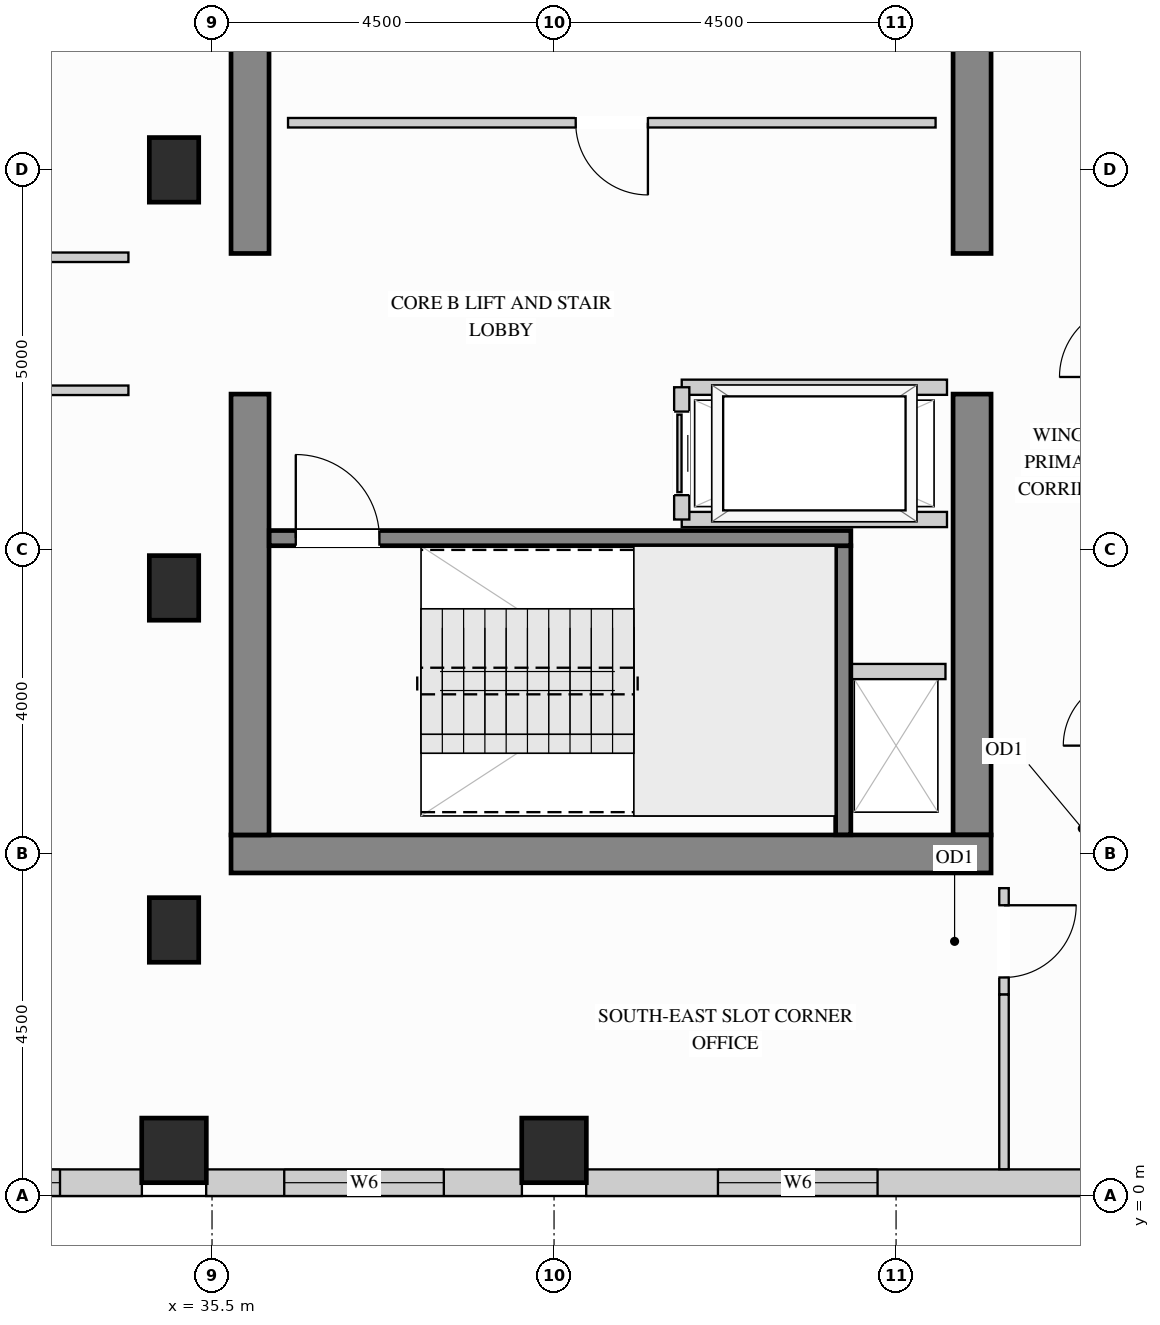
"""IFC4 building model, lengths in metres.
Left out: names, types, materials, properties, quantities, classifications, styles, units other than length and angle.
Written with IfcOpenShell. Run it as: python <this file> out.ifc"""

import sys

from ifc_helpers import new_model, si_unit, direction, frame, frame_2d, origin, origin_2d, place, context, subcontext, project, spatial, rectangle, extrude, source, transform, mapped, element, fill, save


model = new_model("IFC4")
c1 = context("Model", 3, precision=1e-05, world=origin(), true_north=direction((0.0, 1.0)))
c2 = subcontext(c1, "Body", "Model", "MODEL_VIEW")
j1 = project(units=[si_unit("LENGTHUNIT", "METRE"), si_unit("PLANEANGLEUNIT", "RADIAN")], contexts=[c1])
p1 = place(None, origin())
s1 = spatial("IfcSite", under=j1, at=p1, CompositionType="ELEMENT")
p2 = place(p1, origin())
s2 = spatial("IfcBuilding", under=s1, at=p2, CompositionType="ELEMENT")
p3 = place(p2, frame((0.0, 0.0, 255.6)))
s3 = spatial("IfcBuildingStorey", under=s2, at=p3, CompositionType="ELEMENT", Elevation=255.6)
m1 = source(origin(), c2, "Body", "SweptSolid", [
    extrude(rectangle(XDim=0.65, YDim=0.85, at=origin_2d()), origin(), (0.0, 0.0, 1.0), 3.4),
])
for number, where, z_axis, x_axis in (
    (1, (35.0, 13.5, 0.0), (0.0, 0.0, 1.0), (1.0, 0.0, 0.0)),
    (2, (35.0, 3.5, 0.0), (0.0, 0.0, 1.0), (1.0, 0.0, 0.0)),
    (3, (35.0, 8.0, 0.0), (0.0, 0.0, 1.0), (1.0, 0.0, 0.0)),
):
    element("IfcColumn", number, at=place(p3, frame(where, z_axis=z_axis, x_axis=x_axis)), inside=s3, PredefinedType="COLUMN", context=c2, shape_type="MappedRepresentation", body=[
        mapped(m1, transform((0.0, 0.0, 0.0), x_axis=(1.0, 0.0, 0.0), y_axis=(0.0, 1.0, 0.0), z_axis=(0.0, 0.0, 1.0))),
    ])
m2 = source(origin(), c2, "Body", "SweptSolid", [
    extrude(rectangle(XDim=0.85, YDim=0.85, at=origin_2d()), origin(), (0.0, 0.0, 1.0), 3.4),
])
for number, where, z_axis, x_axis in (
    (4, (35.0, 0.6, 0.0), (0.0, 0.0, 1.0), (1.0, 0.0, 0.0)),
    (5, (40.0, 0.6, 0.0), (0.0, 0.0, 1.0), (1.0, 0.0, 0.0)),
):
    element("IfcColumn", number, at=place(p3, frame(where, z_axis=z_axis, x_axis=x_axis)), inside=s3, PredefinedType="COLUMN", context=c2, shape_type="MappedRepresentation", body=[
        mapped(m2, transform((0.0, 0.0, 0.0), x_axis=(1.0, 0.0, 0.0), y_axis=(0.0, 1.0, 0.0), z_axis=(0.0, 0.0, 1.0))),
    ])
m3 = source(origin(), c2, "Body", "SweptSolid", [
    extrude(rectangle(XDim=5.8, YDim=0.5, at=frame_2d((2.9, 0.0))), origin(), (0.0, 0.0, 1.0), 3.4),
])
p4 = place(p3, frame((45.5, 4.75, 0.0), z_axis=(0.0, 0.0, 1.0), x_axis=(0.0, 1.0, 0.0)))
e6 = element("IfcWall", 6, at=p4, inside=s3, PredefinedType="SHEAR", context=c2, shape_type="MappedRepresentation", body=[
    mapped(m3, transform((0.0, 0.0, 0.0), x_axis=(1.0, 0.0, 0.0), y_axis=(0.0, 1.0, 0.0), z_axis=(0.0, 0.0, 1.0))),
])
m4 = source(origin(), c2, "Body", "SweptSolid", [
    extrude(rectangle(XDim=3.85, YDim=0.5, at=frame_2d((1.925, 0.0))), origin(), (0.0, 0.0, 1.0), 3.4),
])
p5 = place(p3, frame((45.5, 12.4, 0.0), z_axis=(0.0, 0.0, 1.0), x_axis=(0.0, 1.0, 0.0)))
e7 = element("IfcWall", 7, at=p5, inside=s3, PredefinedType="SHEAR", context=c2, shape_type="MappedRepresentation", body=[
    mapped(m4, transform((0.0, 0.0, 0.0), x_axis=(1.0, 0.0, 0.0), y_axis=(0.0, 1.0, 0.0), z_axis=(0.0, 0.0, 1.0))),
])
m5 = source(origin(), c2, "Body", "SweptSolid", [
    extrude(rectangle(XDim=10.0, YDim=0.5, at=frame_2d((5.0, 0.0))), origin(), (0.0, 0.0, 1.0), 3.4),
])
p6 = place(p3, frame((35.75, 4.5, 0.0), z_axis=(0.0, 0.0, 1.0), x_axis=(1.0, 0.0, 0.0)))
e8 = element("IfcWall", 8, at=p6, inside=s3, PredefinedType="SHEAR", context=c2, shape_type="MappedRepresentation", body=[
    mapped(m5, transform((0.0, 0.0, 0.0), x_axis=(1.0, 0.0, 0.0), y_axis=(0.0, 1.0, 0.0), z_axis=(0.0, 0.0, 1.0))),
])
p7 = place(p3, frame((36.0, 4.75, 0.0), z_axis=(0.0, 0.0, 1.0), x_axis=(0.0, 1.0, 0.0)))
e9 = element("IfcWall", 9, at=p7, inside=s3, PredefinedType="SHEAR", context=c2, shape_type="MappedRepresentation", body=[
    mapped(m3, transform((0.0, 0.0, 0.0), x_axis=(1.0, 0.0, 0.0), y_axis=(0.0, 1.0, 0.0), z_axis=(0.0, 0.0, 1.0))),
])
p8 = place(p3, frame((36.0, 12.4, 0.0), z_axis=(0.0, 0.0, 1.0), x_axis=(0.0, 1.0, 0.0)))
e10 = element("IfcWall", 10, at=p8, inside=s3, PredefinedType="SHEAR", context=c2, shape_type="MappedRepresentation", body=[
    mapped(m4, transform((0.0, 0.0, 0.0), x_axis=(1.0, 0.0, 0.0), y_axis=(0.0, 1.0, 0.0), z_axis=(0.0, 0.0, 1.0))),
])
p9 = place(p3, frame((30.923, 0.175, 0.0), z_axis=(0.0, 0.0, 1.0), x_axis=(1.0, 0.0, 0.0)))
e11 = element("IfcWall", 11, at=p9, inside=s3, PredefinedType="SOLIDWALL", context=c2, shape_type="SweptSolid", body=[
    extrude(rectangle(XDim=3.654, YDim=0.35, at=frame_2d((1.827, 0.0))), origin(), (0.0, 0.0, 1.0), 3.385),
])
p10 = place(p9, frame((1.077, 0.0, 0.78)))
e12 = element("IfcOpeningElement", 12, at=p10, cuts=e11, PredefinedType="OPENING", context=c2, shape_type="SweptSolid", body=[
    extrude(rectangle(XDim=1.5, YDim=2.0, at=frame_2d((0.75, 1.0))), frame((0.0, 0.185, 0.0), z_axis=(0.0, -1.0, 0.0), x_axis=(1.0, 0.0, 0.0)), (0.0, 0.0, 1.0), 0.37),
])
p11 = place(p3, frame((35.423, 0.175, 0.0), z_axis=(0.0, 0.0, 1.0), x_axis=(1.0, 0.0, 0.0)))
e13 = element("IfcWall", 13, at=p11, inside=s3, PredefinedType="SOLIDWALL", context=c2, shape_type="SweptSolid", body=[
    extrude(rectangle(XDim=4.154, YDim=0.35, at=frame_2d((2.077, 0.0))), origin(), (0.0, 0.0, 1.0), 3.385),
])
p12 = place(p11, frame((1.027, 0.0, 0.78)))
e14 = element("IfcOpeningElement", 14, at=p12, cuts=e13, PredefinedType="OPENING", context=c2, shape_type="SweptSolid", body=[
    extrude(rectangle(XDim=2.1, YDim=2.25, at=frame_2d((1.05, 1.125))), frame((0.0, 0.185, 0.0), z_axis=(0.0, -1.0, 0.0), x_axis=(1.0, 0.0, 0.0)), (0.0, 0.0, 1.0), 0.37),
])
p13 = place(p3, frame((40.423, 0.175, 0.0), z_axis=(0.0, 0.0, 1.0), x_axis=(1.0, 0.0, 0.0)))
e15 = element("IfcWall", 15, at=p13, inside=s3, PredefinedType="SOLIDWALL", context=c2, shape_type="SweptSolid", body=[
    extrude(rectangle(XDim=7.077, YDim=0.35, at=frame_2d((3.539, 0.0))), origin(), (0.0, 0.0, 1.0), 3.385),
])
p14 = place(p13, frame((1.733, 0.0, 0.78)))
e16 = element("IfcOpeningElement", 16, at=p14, cuts=e15, PredefinedType="OPENING", context=c2, shape_type="SweptSolid", body=[
    extrude(rectangle(XDim=2.1, YDim=2.25, at=frame_2d((1.05, 1.125))), frame((0.0, 0.185, 0.0), z_axis=(0.0, -1.0, 0.0), x_axis=(1.0, 0.0, 0.0)), (0.0, 0.0, 1.0), 0.37),
])
p15 = place(p3, frame((36.5, 14.12, 0.0), z_axis=(0.0, 0.0, 1.0), x_axis=(1.0, 0.0, 0.0)))
e17 = element("IfcWall", 17, at=p15, inside=s3, PredefinedType="PARTITIONING", context=c2, shape_type="SweptSolid", body=[
    extrude(rectangle(XDim=8.52, YDim=0.125, at=frame_2d((4.26, 0.0))), origin(), (0.0, 0.0, 1.0), 3.385),
])
p16 = place(p15, frame((3.785, 0.0, 0.0)))
e18 = element("IfcOpeningElement", 18, at=p16, cuts=e17, PredefinedType="OPENING", context=c2, shape_type="SweptSolid", body=[
    extrude(rectangle(XDim=0.95, YDim=2.15, at=frame_2d((0.475, 1.075))), frame((0.0, 0.073, 0.0), z_axis=(0.0, -1.0, 0.0), x_axis=(1.0, 0.0, 0.0)), (0.0, 0.0, 1.0), 0.145),
])
p17 = place(p3, frame((45.92, 2.65, 0.0), z_axis=(0.0, 0.0, 1.0), x_axis=(0.0, 1.0, 0.0)))
e19 = element("IfcWall", 19, at=p17, inside=s3, PredefinedType="PARTITIONING", context=c2, shape_type="SweptSolid", body=[
    extrude(rectangle(XDim=1.4, YDim=0.125, at=frame_2d((0.7, 0.0))), origin(), (0.0, 0.0, 1.0), 3.385),
])
p18 = place(p17, frame((0.225, 0.0, 0.0)))
e20 = element("IfcOpeningElement", 20, at=p18, cuts=e19, PredefinedType="OPENING", context=c2, shape_type="SweptSolid", body=[
    extrude(rectangle(XDim=0.95, YDim=2.15, at=frame_2d((0.475, 1.075))), frame((0.0, 0.073, 0.0), z_axis=(0.0, -1.0, 0.0), x_axis=(1.0, 0.0, 0.0)), (0.0, 0.0, 1.0), 0.145),
])
m6 = source(origin(), c2, "Body", "SweptSolid", [
    extrude(rectangle(XDim=2.298, YDim=0.125, at=frame_2d((1.149, 0.0))), origin(), (0.0, 0.0, 1.0), 3.385),
])
p19 = place(p3, frame((45.92, 0.352, 0.0), z_axis=(0.0, 0.0, 1.0), x_axis=(0.0, 1.0, 0.0)))
e21 = element("IfcWall", 21, at=p19, inside=s3, PredefinedType="PARTITIONING", context=c2, shape_type="MappedRepresentation", body=[
    mapped(m6, transform((0.0, 0.0, 0.0), x_axis=(1.0, 0.0, 0.0), y_axis=(0.0, 1.0, 0.0), z_axis=(0.0, 0.0, 1.0))),
])
p20 = place(p3, frame((29.85, 12.35, 0.0), z_axis=(0.0, 0.0, 1.0), x_axis=(1.0, 0.0, 0.0)))
e22 = element("IfcWall", 22, at=p20, inside=s3, PredefinedType="PARTITIONING", context=c2, shape_type="SweptSolid", body=[
    extrude(rectangle(XDim=4.55, YDim=0.125, at=frame_2d((2.275, 0.0))), origin(), (0.0, 0.0, 1.0), 3.385),
])
p21 = place(p20, frame((1.8, 0.0, 0.0)))
e23 = element("IfcOpeningElement", 23, at=p21, cuts=e22, PredefinedType="OPENING", context=c2, shape_type="SweptSolid", body=[
    extrude(rectangle(XDim=0.95, YDim=2.15, at=frame_2d((0.475, 1.075))), frame((0.0, 0.073, 0.0), z_axis=(0.0, -1.0, 0.0), x_axis=(1.0, 0.0, 0.0)), (0.0, 0.0, 1.0), 0.145),
])
p22 = place(p3, frame((19.5, 10.6, 0.0), z_axis=(0.0, 0.0, 1.0), x_axis=(1.0, 0.0, 0.0)))
e24 = element("IfcWall", 24, at=p22, inside=s3, PredefinedType="PARTITIONING", context=c2, shape_type="SweptSolid", body=[
    extrude(rectangle(XDim=14.9, YDim=0.125, at=frame_2d((7.45, 0.0))), origin(), (0.0, 0.0, 1.0), 3.385),
])
p23 = place(p22, frame((6.975, 0.0, 0.0)))
e25 = element("IfcOpeningElement", 25, at=p23, cuts=e24, PredefinedType="OPENING", context=c2, shape_type="SweptSolid", body=[
    extrude(rectangle(XDim=0.95, YDim=2.15, at=frame_2d((0.475, 1.075))), frame((0.0, 0.073, 0.0), z_axis=(0.0, -1.0, 0.0), x_axis=(1.0, 0.0, 0.0)), (0.0, 0.0, 1.0), 0.145),
])
m7 = source(origin(), c2, "Body", "SweptSolid", [
    extrude(rectangle(XDim=1.3, YDim=0.2, at=frame_2d((0.65, 0.0))), origin(), (0.0, 0.0, 1.0), 3.385),
])
p24 = place(p3, frame((43.85, 6.9, 0.0), z_axis=(0.0, 0.0, 1.0), x_axis=(1.0, 0.0, 0.0)))
e26 = element("IfcWall", 26, at=p24, inside=s3, PredefinedType="PARTITIONING", context=c2, shape_type="MappedRepresentation", body=[
    mapped(m7, transform((0.0, 0.0, 0.0), x_axis=(1.0, 0.0, 0.0), y_axis=(0.0, 1.0, 0.0), z_axis=(0.0, 0.0, 1.0))),
])
m8 = source(origin(), c2, "Body", "SweptSolid", [
    extrude(rectangle(XDim=3.49, YDim=0.2, at=frame_2d((1.745, 0.0))), origin(), (0.0, 0.0, 1.0), 3.385),
])
for number, where, z_axis, x_axis in (
    (27, (41.68, 10.64, 0.0), (0.0, 0.0, 1.0), (1.0, 0.0, 0.0)),
    (28, (41.68, 8.9, 0.0), (0.0, 0.0, 1.0), (1.0, 0.0, 0.0)),
):
    element("IfcWall", number, at=place(p3, frame(where, z_axis=z_axis, x_axis=x_axis)), inside=s3, PredefinedType="PARTITIONING", context=c2, shape_type="MappedRepresentation", body=[
        mapped(m8, transform((0.0, 0.0, 0.0), x_axis=(1.0, 0.0, 0.0), y_axis=(0.0, 1.0, 0.0), z_axis=(0.0, 0.0, 1.0))),
    ])
p25 = place(p3, frame((41.68, 8.9, 0.0), z_axis=(0.0, 0.0, 1.0), x_axis=(0.0, 1.0, 0.0)))
e29 = element("IfcWall", 29, at=p25, inside=s3, PredefinedType="PARTITIONING", context=c2, shape_type="SweptSolid", body=[
    extrude(rectangle(XDim=1.74, YDim=0.2, at=frame_2d((0.87, 0.0))), origin(), (0.0, 0.0, 1.0), 3.385),
])
p26 = place(p25, frame((0.32, 0.0, 0.0)))
e30 = element("IfcOpeningElement", 30, at=p26, cuts=e29, PredefinedType="OPENING", context=c2, shape_type="SweptSolid", body=[
    extrude(rectangle(XDim=1.1, YDim=2.2, at=frame_2d((0.55, 1.1))), frame((0.0, 0.11, 0.0), z_axis=(0.0, -1.0, 0.0), x_axis=(1.0, 0.0, 0.0)), (0.0, 0.0, 1.0), 0.22),
])
m9 = source(origin(), c2, "Body", "SweptSolid", [
    extrude(rectangle(XDim=3.803, YDim=0.2, at=frame_2d((1.901, 0.0))), origin(), (0.0, 0.0, 1.0), 3.4),
])
p27 = place(p3, frame((43.805, 4.752, 0.0), z_axis=(0.0, 0.0, 1.0), x_axis=(0.0, 1.0, 0.0)))
e31 = element("IfcWall", 31, at=p27, inside=s3, PredefinedType="SHEAR", context=c2, shape_type="MappedRepresentation", body=[
    mapped(m9, transform((0.0, 0.0, 0.0), x_axis=(1.0, 0.0, 0.0), y_axis=(0.0, 1.0, 0.0), z_axis=(0.0, 0.0, 1.0))),
])
p28 = place(p3, frame((36.252, 8.655, 0.0), z_axis=(0.0, 0.0, 1.0), x_axis=(1.0, 0.0, 0.0)))
e32 = element("IfcWall", 32, at=p28, inside=s3, PredefinedType="SHEAR", context=c2, shape_type="SweptSolid", body=[
    extrude(rectangle(XDim=7.653, YDim=0.2, at=frame_2d((3.827, 0.0))), origin(), (0.0, 0.0, 1.0), 3.4),
])
p29 = place(p28, frame((0.35, 0.0, 0.0)))
e33 = element("IfcOpeningElement", 33, at=p29, cuts=e32, PredefinedType="OPENING", context=c2, shape_type="SweptSolid", body=[
    extrude(rectangle(XDim=1.1, YDim=2.15, at=frame_2d((0.55, 1.075))), frame((0.0, 0.11, 0.0), z_axis=(0.0, -1.0, 0.0), x_axis=(1.0, 0.0, 0.0)), (0.0, 0.0, 1.0), 0.22),
])
m10 = source(origin(), c2, "Body", "SweptSolid", [
    extrude(rectangle(XDim=1.1, YDim=2.2, at=frame_2d((0.55, 1.1))), frame((0.0, 0.025, 0.0), z_axis=(0.0, -1.0, 0.0), x_axis=(1.0, 0.0, 0.0)), (0.0, 0.0, 1.0), 0.05),
])
p30 = place(p26, origin())
e34 = element("IfcDoor", 34, at=p30, inside=s3, OperationType="SLIDING_TO_LEFT", PredefinedType="DOOR", context=c2, shape_type="MappedRepresentation", body=[
    mapped(m10, transform((0.0, 0.0, 0.0), x_axis=(1.0, 0.0, 0.0), y_axis=(0.0, 1.0, 0.0), z_axis=(0.0, 0.0, 1.0))),
])
fill(e30, e34)
m11 = source(origin(), c2, "Body", "SweptSolid", [
    extrude(rectangle(XDim=0.95, YDim=2.15, at=frame_2d((0.475, 1.075))), frame((0.0, 0.025, 0.0), z_axis=(0.0, -1.0, 0.0), x_axis=(1.0, 0.0, 0.0)), (0.0, 0.0, 1.0), 0.05),
])
p31 = place(p16, origin())
e35 = element("IfcDoor", 35, at=p31, inside=s3, OperationType="SINGLE_SWING_RIGHT", PredefinedType="DOOR", context=c2, shape_type="MappedRepresentation", body=[
    mapped(m11, transform((0.0, 0.0, 0.0), x_axis=(1.0, 0.0, 0.0), y_axis=(0.0, 1.0, 0.0), z_axis=(0.0, 0.0, 1.0))),
])
fill(e18, e35)
p32 = place(p18, origin())
e36 = element("IfcDoor", 36, at=p32, inside=s3, OperationType="SINGLE_SWING_RIGHT", PredefinedType="DOOR", context=c2, shape_type="MappedRepresentation", body=[
    mapped(m11, transform((0.0, 0.0, 0.0), x_axis=(1.0, 0.0, 0.0), y_axis=(0.0, 1.0, 0.0), z_axis=(0.0, 0.0, 1.0))),
])
fill(e20, e36)
m12 = source(origin(), c2, "Body", "SweptSolid", [
    extrude(rectangle(XDim=1.1, YDim=2.15, at=frame_2d((0.55, 1.075))), frame((0.0, 0.025, 0.0), z_axis=(0.0, -1.0, 0.0), x_axis=(1.0, 0.0, 0.0)), (0.0, 0.0, 1.0), 0.05),
])
p33 = place(p29, origin())
e37 = element("IfcDoor", 37, at=p33, inside=s3, OperationType="SINGLE_SWING_LEFT", PredefinedType="DOOR", context=c2, shape_type="MappedRepresentation", body=[
    mapped(m12, transform((0.0, 0.0, 0.0), x_axis=(1.0, 0.0, 0.0), y_axis=(0.0, 1.0, 0.0), z_axis=(0.0, 0.0, 1.0))),
])
fill(e33, e37)
m13 = source(origin(), c2, "Body", "SweptSolid", [
    extrude(rectangle(XDim=1.5, YDim=2.0, at=frame_2d((0.75, 1.0))), frame((0.0, 0.03, 0.0), z_axis=(0.0, -1.0, 0.0), x_axis=(1.0, 0.0, 0.0)), (0.0, 0.0, 1.0), 0.06),
])
p34 = place(p10, origin())
e38 = element("IfcWindow", 38, at=p34, inside=s3, PartitioningType="SINGLE_PANEL", PredefinedType="WINDOW", context=c2, shape_type="MappedRepresentation", body=[
    mapped(m13, transform((0.0, 0.0, 0.0), x_axis=(1.0, 0.0, 0.0), y_axis=(0.0, 1.0, 0.0), z_axis=(0.0, 0.0, 1.0))),
])
fill(e12, e38)
m14 = source(origin(), c2, "Body", "SweptSolid", [
    extrude(rectangle(XDim=2.1, YDim=2.25, at=frame_2d((1.05, 1.125))), frame((0.0, 0.03, 0.0), z_axis=(0.0, -1.0, 0.0), x_axis=(1.0, 0.0, 0.0)), (0.0, 0.0, 1.0), 0.06),
])
p35 = place(p12, origin())
e39 = element("IfcWindow", 39, at=p35, inside=s3, PartitioningType="SINGLE_PANEL", PredefinedType="WINDOW", context=c2, shape_type="MappedRepresentation", body=[
    mapped(m14, transform((0.0, 0.0, 0.0), x_axis=(1.0, 0.0, 0.0), y_axis=(0.0, 1.0, 0.0), z_axis=(0.0, 0.0, 1.0))),
])
fill(e14, e39)
p36 = place(p14, origin())
e40 = element("IfcWindow", 40, at=p36, inside=s3, PartitioningType="SINGLE_PANEL", PredefinedType="WINDOW", context=c2, shape_type="MappedRepresentation", body=[
    mapped(m14, transform((0.0, 0.0, 0.0), x_axis=(1.0, 0.0, 0.0), y_axis=(0.0, 1.0, 0.0), z_axis=(0.0, 0.0, 1.0))),
])
fill(e16, e40)
save(model, sys.argv[1])
